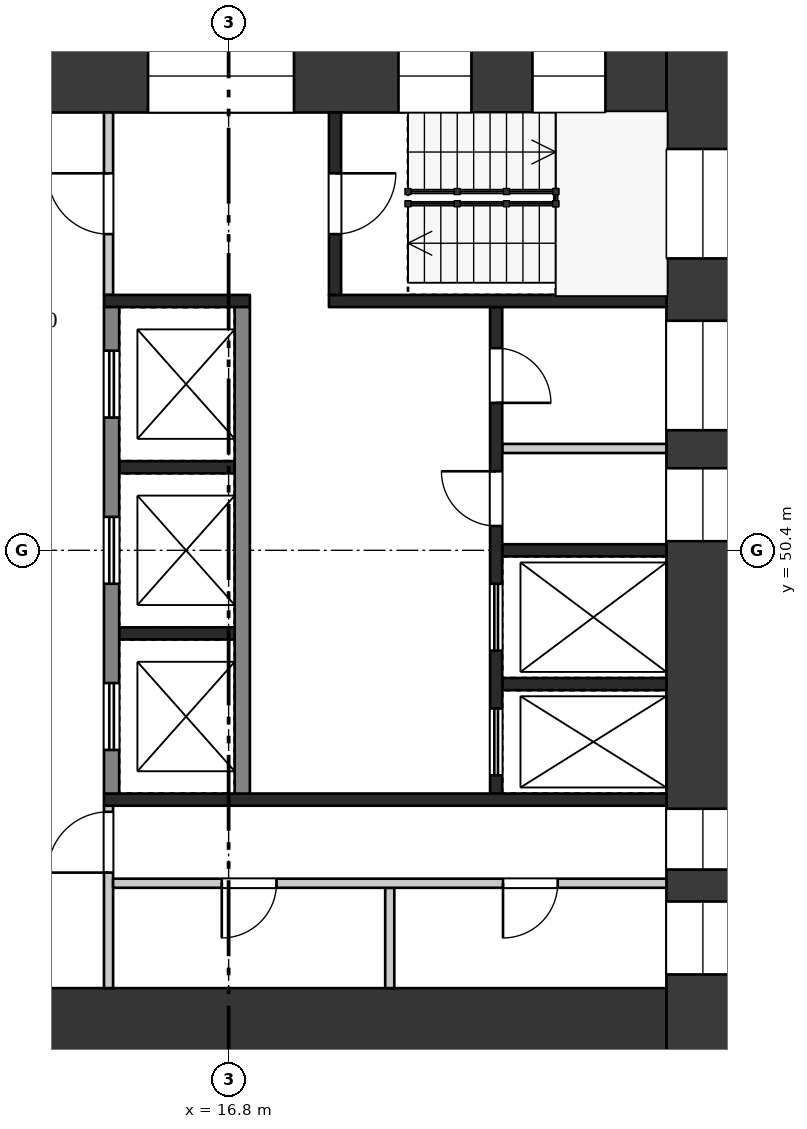
"""IFC4 building model, lengths in metres.
Left out: names, types, materials, properties, quantities, classifications, styles, units other than length and angle.
Written with IfcOpenShell. Run it as: python <this file> out.ifc"""

import sys

from ifc_helpers import new_model, si_unit, direction, frame, frame_2d, origin, place, context, subcontext, project, spatial, rectangle, extrude, element, fill, save


model = new_model("IFC4")
c1 = context("Model", 3, precision=1e-05, world=origin(), true_north=direction((0.0, 1.0)))
c2 = subcontext(c1, "Body", "Model", "MODEL_VIEW")
j1 = project(units=[si_unit("LENGTHUNIT", "METRE"), si_unit("PLANEANGLEUNIT", "RADIAN")], contexts=[c1])
p1 = place(None, origin())
s1 = spatial("IfcSite", under=j1, at=p1, CompositionType="ELEMENT")
p2 = place(p1, origin())
s2 = spatial("IfcBuilding", under=s1, at=p2, CompositionType="ELEMENT")
p3 = place(p2, frame((0.0, 0.0, 256.2)))
s3 = spatial("IfcBuildingStorey", under=s2, at=p3, CompositionType="ELEMENT", Elevation=256.2)
p4 = place(p3, frame((24.6, 58.8, 0.0), z_axis=(0.0, 0.0, 1.0), x_axis=(0.0, -1.0, 0.0)))
e1 = element("IfcWall", 1, at=p4, inside=s3, PredefinedType="SHEAR", context=c2, shape_type="SweptSolid", body=[
    extrude(rectangle(XDim=16.8, YDim=1.2, at=frame_2d((8.4, 0.0))), origin(), (0.0, 0.0, 1.0), 3.22),
])
p5 = place(p4, frame((1.8, 0.0, 0.5)))
e2 = element("IfcOpeningElement", 2, at=p5, cuts=e1, PredefinedType="OPENING", context=c2, shape_type="SweptSolid", body=[
    extrude(rectangle(XDim=1.8, YDim=2.4, at=frame_2d((0.9, 1.2))), frame((0.0, 0.61, 0.0), z_axis=(0.0, -1.0, 0.0), x_axis=(1.0, 0.0, 0.0)), (0.0, 0.0, 1.0), 1.22),
])
p6 = place(p4, frame((4.625, 0.0, 1.6)))
e3 = element("IfcOpeningElement", 3, at=p6, cuts=e1, PredefinedType="OPENING", context=c2, shape_type="SweptSolid", body=[
    extrude(rectangle(XDim=1.8, YDim=1.2, at=frame_2d((0.9, 0.6))), frame((0.0, 0.61, 0.0), z_axis=(0.0, -1.0, 0.0), x_axis=(1.0, 0.0, 0.0)), (0.0, 0.0, 1.0), 1.22),
])
p7 = place(p4, frame((7.05, 0.0, 1.6)))
e4 = element("IfcOpeningElement", 4, at=p7, cuts=e1, PredefinedType="OPENING", context=c2, shape_type="SweptSolid", body=[
    extrude(rectangle(XDim=1.2, YDim=1.2, at=frame_2d((0.6, 0.6))), frame((0.0, 0.61, 0.0), z_axis=(0.0, -1.0, 0.0), x_axis=(1.0, 0.0, 0.0)), (0.0, 0.0, 1.0), 1.22),
])
p8 = place(p4, frame((12.65, 0.0, 0.6)))
e5 = element("IfcOpeningElement", 5, at=p8, cuts=e1, PredefinedType="OPENING", context=c2, shape_type="SweptSolid", body=[
    extrude(rectangle(XDim=1.0, YDim=2.1, at=frame_2d((0.5, 1.05))), frame((0.0, 0.61, 0.0), z_axis=(0.0, -1.0, 0.0), x_axis=(1.0, 0.0, 0.0)), (0.0, 0.0, 1.0), 1.22),
])
p9 = place(p4, frame((14.175, 0.0, 1.6)))
e6 = element("IfcOpeningElement", 6, at=p9, cuts=e1, PredefinedType="OPENING", context=c2, shape_type="SweptSolid", body=[
    extrude(rectangle(XDim=1.2, YDim=1.2, at=frame_2d((0.6, 0.6))), frame((0.0, 0.61, 0.0), z_axis=(0.0, -1.0, 0.0), x_axis=(1.0, 0.0, 0.0)), (0.0, 0.0, 1.0), 1.22),
])
p10 = place(p3, frame((9.6, 58.2, 0.0), z_axis=(0.0, 0.0, 1.0), x_axis=(1.0, 0.0, 0.0)))
e7 = element("IfcWall", 7, at=p10, inside=s3, PredefinedType="SHEAR", context=c2, shape_type="SweptSolid", body=[
    extrude(rectangle(XDim=14.4, YDim=1.2, at=frame_2d((7.2, 0.0))), origin(), (0.0, 0.0, 1.0), 3.22),
])
p11 = place(p10, frame((1.105, 0.0, 0.6)))
e8 = element("IfcOpeningElement", 8, at=p11, cuts=e7, PredefinedType="OPENING", context=c2, shape_type="SweptSolid", body=[
    extrude(rectangle(XDim=3.0, YDim=2.1, at=frame_2d((1.5, 1.05))), frame((0.0, 0.61, 0.0), z_axis=(0.0, -1.0, 0.0), x_axis=(1.0, 0.0, 0.0)), (0.0, 0.0, 1.0), 1.22),
])
p12 = place(p10, frame((5.875, 0.0, 0.6)))
e9 = element("IfcOpeningElement", 9, at=p12, cuts=e7, PredefinedType="OPENING", context=c2, shape_type="SweptSolid", body=[
    extrude(rectangle(XDim=2.4, YDim=2.1, at=frame_2d((1.2, 1.05))), frame((0.0, 0.61, 0.0), z_axis=(0.0, -1.0, 0.0), x_axis=(1.0, 0.0, 0.0)), (0.0, 0.0, 1.0), 1.22),
])
p13 = place(p10, frame((9.993, 0.0, 0.5)))
e10 = element("IfcOpeningElement", 10, at=p13, cuts=e7, PredefinedType="OPENING", context=c2, shape_type="SweptSolid", body=[
    extrude(rectangle(XDim=1.2, YDim=2.4, at=frame_2d((0.6, 1.2))), frame((0.0, 0.61, 0.0), z_axis=(0.0, -1.0, 0.0), x_axis=(1.0, 0.0, 0.0)), (0.0, 0.0, 1.0), 1.22),
])
p14 = place(p10, frame((12.197, 0.0, 0.5)))
e11 = element("IfcOpeningElement", 11, at=p14, cuts=e7, PredefinedType="OPENING", context=c2, shape_type="SweptSolid", body=[
    extrude(rectangle(XDim=1.2, YDim=2.4, at=frame_2d((0.6, 1.2))), frame((0.0, 0.61, 0.0), z_axis=(0.0, -1.0, 0.0), x_axis=(1.0, 0.0, 0.0)), (0.0, 0.0, 1.0), 1.22),
])
p15 = place(p3, frame((9.6, 42.6, 0.0), z_axis=(0.0, 0.0, 1.0), x_axis=(1.0, 0.0, 0.0)))
e12 = element("IfcWall", 12, at=p15, inside=s3, PredefinedType="SHEAR", context=c2, shape_type="SweptSolid", body=[
    extrude(rectangle(XDim=14.4, YDim=1.2, at=frame_2d((7.2, 0.0))), origin(), (0.0, 0.0, 1.0), 3.22),
])
p16 = place(p15, frame((2.1, 0.0, 0.0)))
e13 = element("IfcOpeningElement", 13, at=p16, cuts=e12, PredefinedType="OPENING", context=c2, shape_type="SweptSolid", body=[
    extrude(rectangle(XDim=1.8, YDim=2.1, at=frame_2d((0.9, 1.05))), frame((0.0, 0.61, 0.0), z_axis=(0.0, -1.0, 0.0), x_axis=(1.0, 0.0, 0.0)), (0.0, 0.0, 1.0), 1.22),
])
for number, where, z_axis, x_axis in (
    (14, (15.0, 51.767, 0.0), (0.0, 0.0, 1.0), (1.0, 0.0, 0.0)),
    (15, (15.0, 49.033, 0.0), (0.0, 0.0, 1.0), (1.0, 0.0, 0.0)),
):
    element("IfcWall", number, at=place(p3, frame(where, z_axis=z_axis, x_axis=x_axis)), inside=s3, PredefinedType="SHEAR", context=c2, shape_type="SweptSolid", body=[
        extrude(rectangle(XDim=1.9, YDim=0.2, at=frame_2d((0.95, 0.0))), origin(), (0.0, 0.0, 1.0), 3.22),
    ])
p17 = place(p3, frame((14.875, 54.4, 0.0), z_axis=(0.0, 0.0, 1.0), x_axis=(0.0, -1.0, 0.0)))
e16 = element("IfcWall", 16, at=p17, inside=s3, PredefinedType="SHEAR", context=c2, shape_type="SweptSolid", body=[
    extrude(rectangle(XDim=8.0, YDim=0.25, at=frame_2d((4.0, 0.0))), origin(), (0.0, 0.0, 1.0), 3.22),
])
p18 = place(p17, frame((0.717, 0.0, 0.0)))
e17 = element("IfcOpeningElement", 17, at=p18, cuts=e16, PredefinedType="OPENING", context=c2, shape_type="SweptSolid", body=[
    extrude(rectangle(XDim=1.1, YDim=2.1, at=frame_2d((0.55, 1.05))), frame((0.0, 0.135, 0.0), z_axis=(0.0, -1.0, 0.0), x_axis=(1.0, 0.0, 0.0)), (0.0, 0.0, 1.0), 0.27),
])
p19 = place(p17, frame((3.45, 0.0, 0.0)))
e18 = element("IfcOpeningElement", 18, at=p19, cuts=e16, PredefinedType="OPENING", context=c2, shape_type="SweptSolid", body=[
    extrude(rectangle(XDim=1.1, YDim=2.1, at=frame_2d((0.55, 1.05))), frame((0.0, 0.135, 0.0), z_axis=(0.0, -1.0, 0.0), x_axis=(1.0, 0.0, 0.0)), (0.0, 0.0, 1.0), 0.27),
])
p20 = place(p17, frame((6.183, 0.0, 0.0)))
e19 = element("IfcOpeningElement", 19, at=p20, cuts=e16, PredefinedType="OPENING", context=c2, shape_type="SweptSolid", body=[
    extrude(rectangle(XDim=1.1, YDim=2.1, at=frame_2d((0.55, 1.05))), frame((0.0, 0.135, 0.0), z_axis=(0.0, -1.0, 0.0), x_axis=(1.0, 0.0, 0.0)), (0.0, 0.0, 1.0), 0.27),
])
p21 = place(p3, frame((17.025, 54.4, 0.0), z_axis=(0.0, 0.0, 1.0), x_axis=(0.0, -1.0, 0.0)))
e20 = element("IfcWall", 20, at=p21, inside=s3, PredefinedType="SHEAR", context=c2, shape_type="SweptSolid", body=[
    extrude(rectangle(XDim=8.0, YDim=0.25, at=frame_2d((4.0, 0.0))), origin(), (0.0, 0.0, 1.0), 3.22),
])
for number, where, z_axis, x_axis in (
    (21, (21.3, 50.4, 0.0), (0.0, 0.0, 1.0), (1.0, 0.0, 0.0)),
    (22, (21.3, 48.2, 0.0), (0.0, 0.0, 1.0), (1.0, 0.0, 0.0)),
):
    element("IfcWall", number, at=place(p3, frame(where, z_axis=z_axis, x_axis=x_axis)), inside=s3, PredefinedType="SHEAR", context=c2, shape_type="SweptSolid", body=[
        extrude(rectangle(XDim=2.7, YDim=0.2, at=frame_2d((1.35, 0.0))), origin(), (0.0, 0.0, 1.0), 3.22),
    ])
p22 = place(p3, frame((21.3, 52.075, 0.0), z_axis=(0.0, 0.0, 1.0), x_axis=(1.0, 0.0, 0.0)))
e23 = element("IfcWall", 23, at=p22, inside=s3, PredefinedType="PARTITIONING", context=c2, shape_type="SweptSolid", body=[
    extrude(rectangle(XDim=2.7, YDim=0.15, at=frame_2d((1.35, 0.0))), origin(), (0.0, 0.0, 1.0), 3.22),
])
p23 = place(p3, frame((21.2, 54.4, 0.0), z_axis=(0.0, 0.0, 1.0), x_axis=(0.0, -1.0, 0.0)))
e24 = element("IfcWall", 24, at=p23, inside=s3, PredefinedType="SHEAR", context=c2, shape_type="SweptSolid", body=[
    extrude(rectangle(XDim=8.0, YDim=0.2, at=frame_2d((4.0, 0.0))), origin(), (0.0, 0.0, 1.0), 3.22),
])
p24 = place(p23, frame((0.675, 0.0, 0.0)))
e25 = element("IfcOpeningElement", 25, at=p24, cuts=e24, PredefinedType="OPENING", context=c2, shape_type="SweptSolid", body=[
    extrude(rectangle(XDim=0.9, YDim=2.1, at=frame_2d((0.45, 1.05))), frame((0.0, 0.11, 0.0), z_axis=(0.0, -1.0, 0.0), x_axis=(1.0, 0.0, 0.0)), (0.0, 0.0, 1.0), 0.22),
])
p25 = place(p23, frame((2.7, 0.0, 0.0)))
e26 = element("IfcOpeningElement", 26, at=p25, cuts=e24, PredefinedType="OPENING", context=c2, shape_type="SweptSolid", body=[
    extrude(rectangle(XDim=0.9, YDim=2.1, at=frame_2d((0.45, 1.05))), frame((0.0, 0.11, 0.0), z_axis=(0.0, -1.0, 0.0), x_axis=(1.0, 0.0, 0.0)), (0.0, 0.0, 1.0), 0.22),
])
p26 = place(p23, frame((4.55, 0.0, 0.0)))
e27 = element("IfcOpeningElement", 27, at=p26, cuts=e24, PredefinedType="OPENING", context=c2, shape_type="SweptSolid", body=[
    extrude(rectangle(XDim=1.1, YDim=2.1, at=frame_2d((0.55, 1.05))), frame((0.0, 0.11, 0.0), z_axis=(0.0, -1.0, 0.0), x_axis=(1.0, 0.0, 0.0)), (0.0, 0.0, 1.0), 0.22),
])
p27 = place(p23, frame((6.6, 0.0, 0.0)))
e28 = element("IfcOpeningElement", 28, at=p27, cuts=e24, PredefinedType="OPENING", context=c2, shape_type="SweptSolid", body=[
    extrude(rectangle(XDim=1.1, YDim=2.1, at=frame_2d((0.55, 1.05))), frame((0.0, 0.11, 0.0), z_axis=(0.0, -1.0, 0.0), x_axis=(1.0, 0.0, 0.0)), (0.0, 0.0, 1.0), 0.22),
])
p28 = place(p3, frame((14.75, 54.5, 0.0), z_axis=(0.0, 0.0, 1.0), x_axis=(1.0, 0.0, 0.0)))
e29 = element("IfcWall", 29, at=p28, inside=s3, PredefinedType="SHEAR", context=c2, shape_type="SweptSolid", body=[
    extrude(rectangle(XDim=2.4, YDim=0.2, at=frame_2d((1.2, 0.0))), origin(), (0.0, 0.0, 1.0), 3.22),
])
p29 = place(p3, frame((18.45, 54.5, 0.0), z_axis=(0.0, 0.0, 1.0), x_axis=(1.0, 0.0, 0.0)))
e30 = element("IfcWall", 30, at=p29, inside=s3, PredefinedType="SHEAR", context=c2, shape_type="SweptSolid", body=[
    extrude(rectangle(XDim=5.55, YDim=0.2, at=frame_2d((2.775, 0.0))), origin(), (0.0, 0.0, 1.0), 3.22),
])
p30 = place(p3, frame((14.825, 57.6, 0.0), z_axis=(0.0, 0.0, 1.0), x_axis=(0.0, -1.0, 0.0)))
e31 = element("IfcWall", 31, at=p30, inside=s3, PredefinedType="PARTITIONING", context=c2, shape_type="SweptSolid", body=[
    extrude(rectangle(XDim=3.0, YDim=0.15, at=frame_2d((1.5, 0.0))), origin(), (0.0, 0.0, 1.0), 3.22),
])
p31 = place(p30, frame((1.0, 0.0, 0.0)))
e32 = element("IfcOpeningElement", 32, at=p31, cuts=e31, PredefinedType="OPENING", context=c2, shape_type="SweptSolid", body=[
    extrude(rectangle(XDim=1.0, YDim=2.1, at=frame_2d((0.5, 1.05))), frame((0.0, 0.085, 0.0), z_axis=(0.0, -1.0, 0.0), x_axis=(1.0, 0.0, 0.0)), (0.0, 0.0, 1.0), 0.17),
])
p32 = place(p3, frame((18.55, 57.6, 0.0), z_axis=(0.0, 0.0, 1.0), x_axis=(0.0, -1.0, 0.0)))
e33 = element("IfcWall", 33, at=p32, inside=s3, PredefinedType="SHEAR", context=c2, shape_type="SweptSolid", body=[
    extrude(rectangle(XDim=3.0, YDim=0.2, at=frame_2d((1.5, 0.0))), origin(), (0.0, 0.0, 1.0), 3.22),
])
p33 = place(p32, frame((1.0, 0.0, 0.0)))
e34 = element("IfcOpeningElement", 34, at=p33, cuts=e33, PredefinedType="OPENING", context=c2, shape_type="SweptSolid", body=[
    extrude(rectangle(XDim=1.0, YDim=2.1, at=frame_2d((0.5, 1.05))), frame((0.0, 0.11, 0.0), z_axis=(0.0, -1.0, 0.0), x_axis=(1.0, 0.0, 0.0)), (0.0, 0.0, 1.0), 0.22),
])
p34 = place(p3, frame((14.75, 46.3, 0.0), z_axis=(0.0, 0.0, 1.0), x_axis=(1.0, 0.0, 0.0)))
e35 = element("IfcWall", 35, at=p34, inside=s3, PredefinedType="SHEAR", context=c2, shape_type="SweptSolid", body=[
    extrude(rectangle(XDim=9.25, YDim=0.2, at=frame_2d((4.625, 0.0))), origin(), (0.0, 0.0, 1.0), 3.22),
])
p35 = place(p3, frame((14.825, 46.2, 0.0), z_axis=(0.0, 0.0, 1.0), x_axis=(0.0, -1.0, 0.0)))
e36 = element("IfcWall", 36, at=p35, inside=s3, PredefinedType="PARTITIONING", context=c2, shape_type="SweptSolid", body=[
    extrude(rectangle(XDim=3.0, YDim=0.15, at=frame_2d((1.5, 0.0))), origin(), (0.0, 0.0, 1.0), 3.22),
])
p36 = place(p35, frame((0.1, 0.0, 0.0)))
e37 = element("IfcOpeningElement", 37, at=p36, cuts=e36, PredefinedType="OPENING", context=c2, shape_type="SweptSolid", body=[
    extrude(rectangle(XDim=1.0, YDim=2.1, at=frame_2d((0.5, 1.05))), frame((0.0, 0.085, 0.0), z_axis=(0.0, -1.0, 0.0), x_axis=(1.0, 0.0, 0.0)), (0.0, 0.0, 1.0), 0.17),
])
p37 = place(p3, frame((19.45, 44.85, 0.0), z_axis=(0.0, 0.0, 1.0), x_axis=(0.0, -1.0, 0.0)))
e38 = element("IfcWall", 38, at=p37, inside=s3, PredefinedType="PARTITIONING", context=c2, shape_type="SweptSolid", body=[
    extrude(rectangle(XDim=1.65, YDim=0.15, at=frame_2d((0.825, 0.0))), origin(), (0.0, 0.0, 1.0), 3.22),
])
p38 = place(p3, frame((14.9, 44.925, 0.0), z_axis=(0.0, 0.0, 1.0), x_axis=(1.0, 0.0, 0.0)))
e39 = element("IfcWall", 39, at=p38, inside=s3, PredefinedType="PARTITIONING", context=c2, shape_type="SweptSolid", body=[
    extrude(rectangle(XDim=9.1, YDim=0.15, at=frame_2d((4.55, 0.0))), origin(), (0.0, 0.0, 1.0), 3.22),
])
p39 = place(p38, frame((1.788, 0.0, 0.0)))
e40 = element("IfcOpeningElement", 40, at=p39, cuts=e39, PredefinedType="OPENING", context=c2, shape_type="SweptSolid", body=[
    extrude(rectangle(XDim=0.9, YDim=2.1, at=frame_2d((0.45, 1.05))), frame((0.0, 0.085, 0.0), z_axis=(0.0, -1.0, 0.0), x_axis=(1.0, 0.0, 0.0)), (0.0, 0.0, 1.0), 0.17),
])
p40 = place(p38, frame((6.413, 0.0, 0.0)))
e41 = element("IfcOpeningElement", 41, at=p40, cuts=e39, PredefinedType="OPENING", context=c2, shape_type="SweptSolid", body=[
    extrude(rectangle(XDim=0.9, YDim=2.1, at=frame_2d((0.45, 1.05))), frame((0.0, 0.085, 0.0), z_axis=(0.0, -1.0, 0.0), x_axis=(1.0, 0.0, 0.0)), (0.0, 0.0, 1.0), 0.17),
])
p41 = place(p18, origin())
e42 = element("IfcDoor", 42, at=p41, inside=s3, OperationType="DOUBLE_DOOR_SLIDING", PredefinedType="DOOR", context=c2, shape_type="SweptSolid", body=[
    extrude(rectangle(XDim=1.1, YDim=2.1, at=frame_2d((0.55, 1.05))), frame((0.0, 0.025, 0.0), z_axis=(0.0, -1.0, 0.0), x_axis=(1.0, 0.0, 0.0)), (0.0, 0.0, 1.0), 0.05),
])
fill(e17, e42)
p42 = place(p19, origin())
e43 = element("IfcDoor", 43, at=p42, inside=s3, OperationType="DOUBLE_DOOR_SLIDING", PredefinedType="DOOR", context=c2, shape_type="SweptSolid", body=[
    extrude(rectangle(XDim=1.1, YDim=2.1, at=frame_2d((0.55, 1.05))), frame((0.0, 0.025, 0.0), z_axis=(0.0, -1.0, 0.0), x_axis=(1.0, 0.0, 0.0)), (0.0, 0.0, 1.0), 0.05),
])
fill(e18, e43)
p43 = place(p20, origin())
e44 = element("IfcDoor", 44, at=p43, inside=s3, OperationType="DOUBLE_DOOR_SLIDING", PredefinedType="DOOR", context=c2, shape_type="SweptSolid", body=[
    extrude(rectangle(XDim=1.1, YDim=2.1, at=frame_2d((0.55, 1.05))), frame((0.0, 0.025, 0.0), z_axis=(0.0, -1.0, 0.0), x_axis=(1.0, 0.0, 0.0)), (0.0, 0.0, 1.0), 0.05),
])
fill(e19, e44)
p44 = place(p24, origin())
e45 = element("IfcDoor", 45, at=p44, inside=s3, OperationType="SINGLE_SWING_RIGHT", PredefinedType="DOOR", context=c2, shape_type="SweptSolid", body=[
    extrude(rectangle(XDim=0.9, YDim=2.1, at=frame_2d((0.45, 1.05))), frame((0.0, 0.025, 0.0), z_axis=(0.0, -1.0, 0.0), x_axis=(1.0, 0.0, 0.0)), (0.0, 0.0, 1.0), 0.05),
])
fill(e25, e45)
p45 = place(p25, frame((0.9, 0.0, 0.0), z_axis=(0.0, 0.0, 1.0), x_axis=(-1.0, 0.0, 0.0)))
e46 = element("IfcDoor", 46, at=p45, inside=s3, OperationType="SINGLE_SWING_RIGHT", PredefinedType="DOOR", context=c2, shape_type="SweptSolid", body=[
    extrude(rectangle(XDim=0.9, YDim=2.1, at=frame_2d((0.45, 1.05))), frame((0.0, 0.025, 0.0), z_axis=(0.0, -1.0, 0.0), x_axis=(1.0, 0.0, 0.0)), (0.0, 0.0, 1.0), 0.05),
])
fill(e26, e46)
p46 = place(p26, origin())
e47 = element("IfcDoor", 47, at=p46, inside=s3, OperationType="DOUBLE_DOOR_SLIDING", PredefinedType="DOOR", context=c2, shape_type="SweptSolid", body=[
    extrude(rectangle(XDim=1.1, YDim=2.1, at=frame_2d((0.55, 1.05))), frame((0.0, 0.025, 0.0), z_axis=(0.0, -1.0, 0.0), x_axis=(1.0, 0.0, 0.0)), (0.0, 0.0, 1.0), 0.05),
])
fill(e27, e47)
p47 = place(p27, origin())
e48 = element("IfcDoor", 48, at=p47, inside=s3, OperationType="DOUBLE_DOOR_SLIDING", PredefinedType="DOOR", context=c2, shape_type="SweptSolid", body=[
    extrude(rectangle(XDim=1.1, YDim=2.1, at=frame_2d((0.55, 1.05))), frame((0.0, 0.025, 0.0), z_axis=(0.0, -1.0, 0.0), x_axis=(1.0, 0.0, 0.0)), (0.0, 0.0, 1.0), 0.05),
])
fill(e28, e48)
p48 = place(p31, frame((1.0, 0.0, 0.0), z_axis=(0.0, 0.0, 1.0), x_axis=(-1.0, 0.0, 0.0)))
e49 = element("IfcDoor", 49, at=p48, inside=s3, OperationType="SINGLE_SWING_RIGHT", PredefinedType="DOOR", context=c2, shape_type="SweptSolid", body=[
    extrude(rectangle(XDim=1.0, YDim=2.1, at=frame_2d((0.5, 1.05))), frame((0.0, 0.025, 0.0), z_axis=(0.0, -1.0, 0.0), x_axis=(1.0, 0.0, 0.0)), (0.0, 0.0, 1.0), 0.05),
])
fill(e32, e49)
p49 = place(p33, origin())
e50 = element("IfcDoor", 50, at=p49, inside=s3, OperationType="SINGLE_SWING_LEFT", PredefinedType="DOOR", context=c2, shape_type="SweptSolid", body=[
    extrude(rectangle(XDim=1.0, YDim=2.1, at=frame_2d((0.5, 1.05))), frame((0.0, 0.025, 0.0), z_axis=(0.0, -1.0, 0.0), x_axis=(1.0, 0.0, 0.0)), (0.0, 0.0, 1.0), 0.05),
])
fill(e34, e50)
p50 = place(p36, frame((1.0, 0.0, 0.0), z_axis=(0.0, 0.0, 1.0), x_axis=(-1.0, 0.0, 0.0)))
e51 = element("IfcDoor", 51, at=p50, inside=s3, OperationType="SINGLE_SWING_LEFT", PredefinedType="DOOR", context=c2, shape_type="SweptSolid", body=[
    extrude(rectangle(XDim=1.0, YDim=2.1, at=frame_2d((0.5, 1.05))), frame((0.0, 0.025, 0.0), z_axis=(0.0, -1.0, 0.0), x_axis=(1.0, 0.0, 0.0)), (0.0, 0.0, 1.0), 0.05),
])
fill(e37, e51)
p51 = place(p39, frame((0.9, 0.0, 0.0), z_axis=(0.0, 0.0, 1.0), x_axis=(-1.0, 0.0, 0.0)))
e52 = element("IfcDoor", 52, at=p51, inside=s3, OperationType="SINGLE_SWING_RIGHT", PredefinedType="DOOR", context=c2, shape_type="SweptSolid", body=[
    extrude(rectangle(XDim=0.9, YDim=2.1, at=frame_2d((0.45, 1.05))), frame((0.0, 0.025, 0.0), z_axis=(0.0, -1.0, 0.0), x_axis=(1.0, 0.0, 0.0)), (0.0, 0.0, 1.0), 0.05),
])
fill(e40, e52)
p52 = place(p40, frame((0.9, 0.0, 0.0), z_axis=(0.0, 0.0, 1.0), x_axis=(-1.0, 0.0, 0.0)))
e53 = element("IfcDoor", 53, at=p52, inside=s3, OperationType="SINGLE_SWING_RIGHT", PredefinedType="DOOR", context=c2, shape_type="SweptSolid", body=[
    extrude(rectangle(XDim=0.9, YDim=2.1, at=frame_2d((0.45, 1.05))), frame((0.0, 0.025, 0.0), z_axis=(0.0, -1.0, 0.0), x_axis=(1.0, 0.0, 0.0)), (0.0, 0.0, 1.0), 0.05),
])
fill(e41, e53)
p53 = place(p5, origin())
e54 = element("IfcWindow", 54, at=p53, inside=s3, PartitioningType="SINGLE_PANEL", PredefinedType="WINDOW", context=c2, shape_type="SweptSolid", body=[
    extrude(rectangle(XDim=1.8, YDim=2.4, at=frame_2d((0.9, 1.2))), frame((0.0, 0.03, 0.0), z_axis=(0.0, -1.0, 0.0), x_axis=(1.0, 0.0, 0.0)), (0.0, 0.0, 1.0), 0.06),
])
fill(e2, e54)
p54 = place(p6, origin())
e55 = element("IfcWindow", 55, at=p54, inside=s3, PartitioningType="SINGLE_PANEL", PredefinedType="WINDOW", context=c2, shape_type="SweptSolid", body=[
    extrude(rectangle(XDim=1.8, YDim=1.2, at=frame_2d((0.9, 0.6))), frame((0.0, 0.03, 0.0), z_axis=(0.0, -1.0, 0.0), x_axis=(1.0, 0.0, 0.0)), (0.0, 0.0, 1.0), 0.06),
])
fill(e3, e55)
p55 = place(p7, origin())
e56 = element("IfcWindow", 56, at=p55, inside=s3, PartitioningType="SINGLE_PANEL", PredefinedType="WINDOW", context=c2, shape_type="SweptSolid", body=[
    extrude(rectangle(XDim=1.2, YDim=1.2, at=frame_2d((0.6, 0.6))), frame((0.0, 0.03, 0.0), z_axis=(0.0, -1.0, 0.0), x_axis=(1.0, 0.0, 0.0)), (0.0, 0.0, 1.0), 0.06),
])
fill(e4, e56)
p56 = place(p8, origin())
e57 = element("IfcWindow", 57, at=p56, inside=s3, PartitioningType="SINGLE_PANEL", PredefinedType="WINDOW", context=c2, shape_type="SweptSolid", body=[
    extrude(rectangle(XDim=1.0, YDim=2.1, at=frame_2d((0.5, 1.05))), frame((0.0, 0.03, 0.0), z_axis=(0.0, -1.0, 0.0), x_axis=(1.0, 0.0, 0.0)), (0.0, 0.0, 1.0), 0.06),
])
fill(e5, e57)
p57 = place(p9, origin())
e58 = element("IfcWindow", 58, at=p57, inside=s3, PartitioningType="SINGLE_PANEL", PredefinedType="WINDOW", context=c2, shape_type="SweptSolid", body=[
    extrude(rectangle(XDim=1.2, YDim=1.2, at=frame_2d((0.6, 0.6))), frame((0.0, 0.03, 0.0), z_axis=(0.0, -1.0, 0.0), x_axis=(1.0, 0.0, 0.0)), (0.0, 0.0, 1.0), 0.06),
])
fill(e6, e58)
p58 = place(p12, origin())
e59 = element("IfcWindow", 59, at=p58, inside=s3, PartitioningType="SINGLE_PANEL", PredefinedType="WINDOW", context=c2, shape_type="SweptSolid", body=[
    extrude(rectangle(XDim=2.4, YDim=2.1, at=frame_2d((1.2, 1.05))), frame((0.0, 0.03, 0.0), z_axis=(0.0, -1.0, 0.0), x_axis=(1.0, 0.0, 0.0)), (0.0, 0.0, 1.0), 0.06),
])
fill(e9, e59)
p59 = place(p13, origin())
e60 = element("IfcWindow", 60, at=p59, inside=s3, PartitioningType="SINGLE_PANEL", PredefinedType="WINDOW", context=c2, shape_type="SweptSolid", body=[
    extrude(rectangle(XDim=1.2, YDim=2.4, at=frame_2d((0.6, 1.2))), frame((0.0, 0.03, 0.0), z_axis=(0.0, -1.0, 0.0), x_axis=(1.0, 0.0, 0.0)), (0.0, 0.0, 1.0), 0.06),
])
fill(e10, e60)
p60 = place(p14, origin())
e61 = element("IfcWindow", 61, at=p60, inside=s3, PartitioningType="SINGLE_PANEL", PredefinedType="WINDOW", context=c2, shape_type="SweptSolid", body=[
    extrude(rectangle(XDim=1.2, YDim=2.4, at=frame_2d((0.6, 1.2))), frame((0.0, 0.03, 0.0), z_axis=(0.0, -1.0, 0.0), x_axis=(1.0, 0.0, 0.0)), (0.0, 0.0, 1.0), 0.06),
])
fill(e11, e61)
save(model, sys.argv[1])
